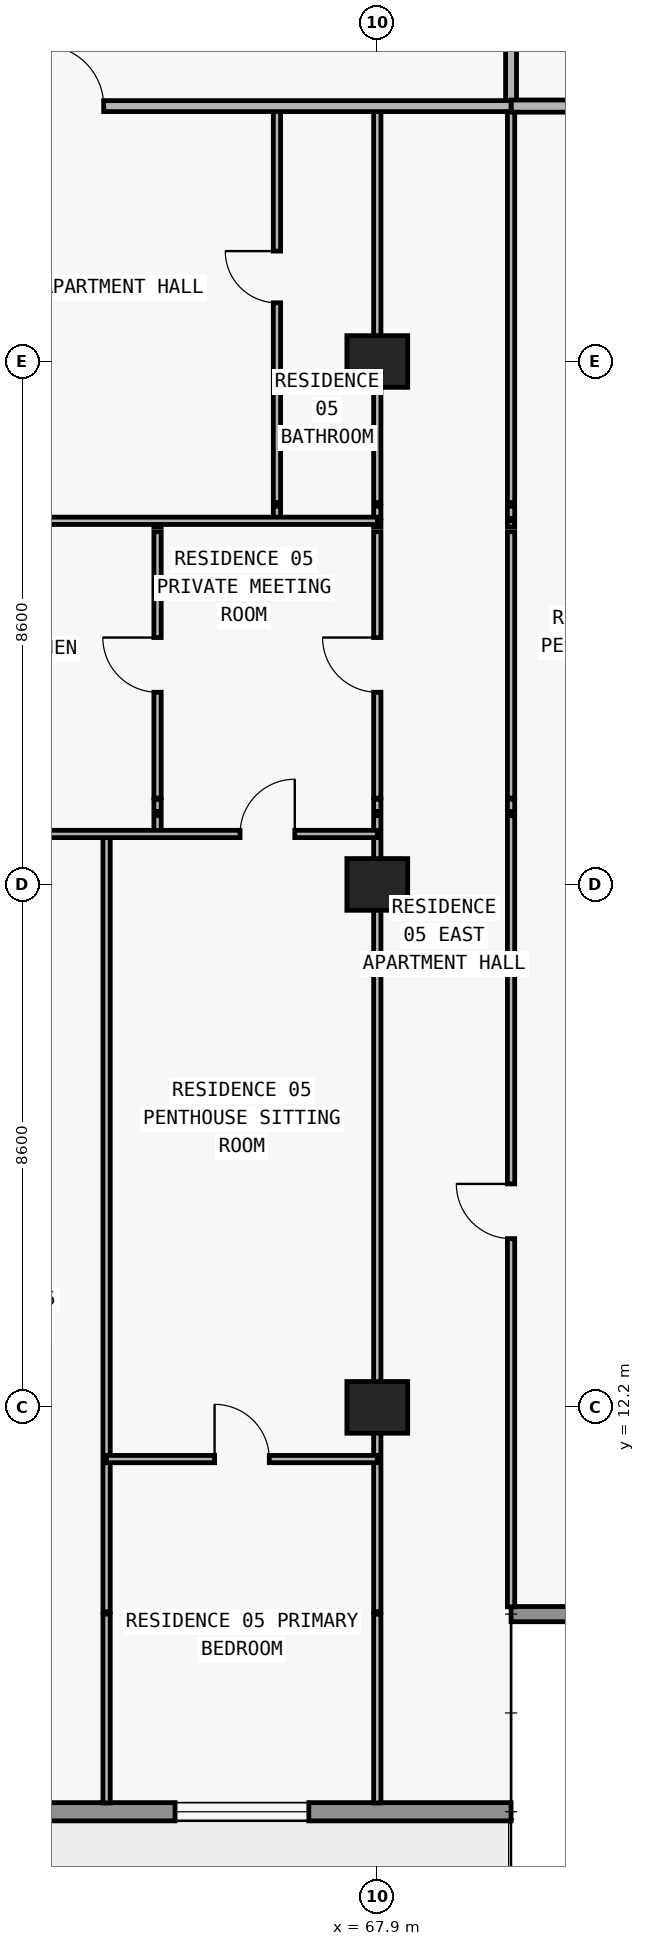
"""IFC4 building model, lengths in metres.
Left out: names, types, materials, properties, quantities, classifications, styles, units other than length and angle.
Written with IfcOpenShell. Run it as: python <this file> out.ifc"""

import sys

from ifc_helpers import new_model, si_unit, direction, frame, frame_2d, origin, origin_2d, place, context, subcontext, project, spatial, rectangle, extrude, element, fill, save


model = new_model("IFC4")
c1 = context("Model", 3, precision=1e-05, world=origin(), true_north=direction((0.0, 1.0)))
c2 = subcontext(c1, "Body", "Model", "MODEL_VIEW")
j1 = project(units=[si_unit("LENGTHUNIT", "METRE"), si_unit("PLANEANGLEUNIT", "RADIAN")], contexts=[c1])
p1 = place(None, origin())
s1 = spatial("IfcSite", under=j1, at=p1, CompositionType="ELEMENT")
p2 = place(p1, origin())
s2 = spatial("IfcBuilding", under=s1, at=p2, CompositionType="ELEMENT")
p3 = place(p2, frame((0.0, 0.0, 119.1)))
s3 = spatial("IfcBuildingStorey", under=s2, at=p3, CompositionType="ELEMENT", Elevation=119.1)
for number, where, z_axis, x_axis in (
    (1, (67.9, 12.2, 0.0), (0.0, 0.0, 1.0), (1.0, 0.0, 0.0)),
    (2, (67.9, 20.8, 0.0), (0.0, 0.0, 1.0), (1.0, 0.0, 0.0)),
    (3, (67.9, 29.4, 0.0), (0.0, 0.0, 1.0), (1.0, 0.0, 0.0)),
):
    element("IfcColumn", number, at=place(p3, frame(where, z_axis=z_axis, x_axis=x_axis)), inside=s3, PredefinedType="COLUMN", context=c2, shape_type="SweptSolid", body=[
        extrude(rectangle(XDim=1.0, YDim=0.85, at=origin_2d()), origin(), (0.0, 0.0, 1.0), 3.05),
    ])
p4 = place(p3, frame((70.1, 5.55, 0.0), z_axis=(0.0, 0.0, 1.0), x_axis=(-1.0, 0.0, 0.0)))
e4 = element("IfcWall", 4, at=p4, inside=s3, PredefinedType="STANDARD", context=c2, shape_type="SweptSolid", body=[
    extrude(rectangle(XDim=62.4, YDim=0.3, at=frame_2d((31.2, 0.0))), origin(), (0.0, 0.0, 1.0), 3.05),
])
p5 = place(p4, frame((57.29, 0.0, 0.0)))
e5 = element("IfcOpeningElement", 5, at=p5, cuts=e4, PredefinedType="OPENING", context=c2, shape_type="SweptSolid", body=[
    extrude(rectangle(XDim=2.0, YDim=2.3, at=frame_2d((1.0, 1.15))), frame((0.0, 0.16, 0.0), z_axis=(0.0, -1.0, 0.0), x_axis=(1.0, 0.0, 0.0)), (0.0, 0.0, 1.0), 0.32),
])
p6 = place(p4, frame((52.61, 0.0, 0.65)))
e6 = element("IfcOpeningElement", 6, at=p6, cuts=e4, PredefinedType="OPENING", context=c2, shape_type="SweptSolid", body=[
    extrude(rectangle(XDim=2.6, YDim=1.85, at=frame_2d((1.3, 0.925))), frame((0.0, 0.16, 0.0), z_axis=(0.0, -1.0, 0.0), x_axis=(1.0, 0.0, 0.0)), (0.0, 0.0, 1.0), 0.32),
])
p7 = place(p4, frame((46.5, 0.0, 0.85)))
e7 = element("IfcOpeningElement", 7, at=p7, cuts=e4, PredefinedType="OPENING", context=c2, shape_type="SweptSolid", body=[
    extrude(rectangle(XDim=2.2, YDim=1.55, at=frame_2d((1.1, 0.775))), frame((0.0, 0.16, 0.0), z_axis=(0.0, -1.0, 0.0), x_axis=(1.0, 0.0, 0.0)), (0.0, 0.0, 1.0), 0.32),
])
p8 = place(p4, frame((40.49, 0.0, 0.0)))
e8 = element("IfcOpeningElement", 8, at=p8, cuts=e4, PredefinedType="OPENING", context=c2, shape_type="SweptSolid", body=[
    extrude(rectangle(XDim=2.0, YDim=2.3, at=frame_2d((1.0, 1.15))), frame((0.0, 0.16, 0.0), z_axis=(0.0, -1.0, 0.0), x_axis=(1.0, 0.0, 0.0)), (0.0, 0.0, 1.0), 0.32),
])
p9 = place(p4, frame((35.81, 0.0, 0.65)))
e9 = element("IfcOpeningElement", 9, at=p9, cuts=e4, PredefinedType="OPENING", context=c2, shape_type="SweptSolid", body=[
    extrude(rectangle(XDim=2.6, YDim=1.85, at=frame_2d((1.3, 0.925))), frame((0.0, 0.16, 0.0), z_axis=(0.0, -1.0, 0.0), x_axis=(1.0, 0.0, 0.0)), (0.0, 0.0, 1.0), 0.32),
])
p10 = place(p4, frame((30.1, 0.0, 0.85)))
e10 = element("IfcOpeningElement", 10, at=p10, cuts=e4, PredefinedType="OPENING", context=c2, shape_type="SweptSolid", body=[
    extrude(rectangle(XDim=2.2, YDim=1.55, at=frame_2d((1.1, 0.775))), frame((0.0, 0.16, 0.0), z_axis=(0.0, -1.0, 0.0), x_axis=(1.0, 0.0, 0.0)), (0.0, 0.0, 1.0), 0.32),
])
p11 = place(p4, frame((24.426, 0.0, 0.0)))
e11 = element("IfcOpeningElement", 11, at=p11, cuts=e4, PredefinedType="OPENING", context=c2, shape_type="SweptSolid", body=[
    extrude(rectangle(XDim=2.0, YDim=2.3, at=frame_2d((1.0, 1.15))), frame((0.0, 0.16, 0.0), z_axis=(0.0, -1.0, 0.0), x_axis=(1.0, 0.0, 0.0)), (0.0, 0.0, 1.0), 0.32),
])
p12 = place(p4, frame((20.126, 0.0, 0.85)))
e12 = element("IfcOpeningElement", 12, at=p12, cuts=e4, PredefinedType="OPENING", context=c2, shape_type="SweptSolid", body=[
    extrude(rectangle(XDim=2.2, YDim=1.55, at=frame_2d((1.1, 0.775))), frame((0.0, 0.16, 0.0), z_axis=(0.0, -1.0, 0.0), x_axis=(1.0, 0.0, 0.0)), (0.0, 0.0, 1.0), 0.32),
])
p13 = place(p4, frame((15.69, 0.0, 0.0)))
e13 = element("IfcOpeningElement", 13, at=p13, cuts=e4, PredefinedType="OPENING", context=c2, shape_type="SweptSolid", body=[
    extrude(rectangle(XDim=2.0, YDim=2.3, at=frame_2d((1.0, 1.15))), frame((0.0, 0.16, 0.0), z_axis=(0.0, -1.0, 0.0), x_axis=(1.0, 0.0, 0.0)), (0.0, 0.0, 1.0), 0.32),
])
p14 = place(p4, frame((11.59, 0.0, 0.85)))
e14 = element("IfcOpeningElement", 14, at=p14, cuts=e4, PredefinedType="OPENING", context=c2, shape_type="SweptSolid", body=[
    extrude(rectangle(XDim=1.8, YDim=1.55, at=frame_2d((0.9, 0.775))), frame((0.0, 0.16, 0.0), z_axis=(0.0, -1.0, 0.0), x_axis=(1.0, 0.0, 0.0)), (0.0, 0.0, 1.0), 0.32),
])
p15 = place(p4, frame((7.626, 0.0, 0.0)))
e15 = element("IfcOpeningElement", 15, at=p15, cuts=e4, PredefinedType="OPENING", context=c2, shape_type="SweptSolid", body=[
    extrude(rectangle(XDim=2.0, YDim=2.3, at=frame_2d((1.0, 1.15))), frame((0.0, 0.16, 0.0), z_axis=(0.0, -1.0, 0.0), x_axis=(1.0, 0.0, 0.0)), (0.0, 0.0, 1.0), 0.32),
])
p16 = place(p4, frame((3.326, 0.0, 0.85)))
e16 = element("IfcOpeningElement", 16, at=p16, cuts=e4, PredefinedType="OPENING", context=c2, shape_type="SweptSolid", body=[
    extrude(rectangle(XDim=2.2, YDim=1.55, at=frame_2d((1.1, 0.775))), frame((0.0, 0.16, 0.0), z_axis=(0.0, -1.0, 0.0), x_axis=(1.0, 0.0, 0.0)), (0.0, 0.0, 1.0), 0.32),
])
p17 = place(p3, frame((70.1, 8.8, 0.0), z_axis=(0.0, 0.0, 1.0), x_axis=(1.0, 0.0, 0.0)))
e17 = element("IfcWall", 17, at=p17, inside=s3, PredefinedType="ELEMENTEDWALL", context=c2, shape_type="SweptSolid", body=[
    extrude(rectangle(XDim=3.65, YDim=0.25, at=frame_2d((1.825, 0.0))), origin(), (0.0, 0.0, 1.0), 3.05),
])
p18 = place(p3, frame((63.448, 5.695, 0.0), z_axis=(0.0, 0.0, 1.0), x_axis=(0.0, 1.0, 0.0)))
e18 = element("IfcWall", 18, at=p18, inside=s3, PredefinedType="PARTITIONING", context=c2, shape_type="SweptSolid", body=[
    extrude(rectangle(XDim=3.105, YDim=0.12, at=frame_2d((1.552, 0.0))), origin(), (0.0, 0.0, 1.0), 3.05),
])
p19 = place(p3, frame((63.448, 8.84, 0.0), z_axis=(0.0, 0.0, 1.0), x_axis=(0.0, 1.0, 0.0)))
e19 = element("IfcWall", 19, at=p19, inside=s3, PredefinedType="PARTITIONING", context=c2, shape_type="SweptSolid", body=[
    extrude(rectangle(XDim=12.79, YDim=0.12, at=frame_2d((6.395, 0.0))), origin(), (0.0, 0.0, 1.0), 3.05),
])
p20 = place(p3, frame((64.286, 21.63, 0.0), z_axis=(0.0, 0.0, 1.0), x_axis=(0.0, 1.0, 0.0)))
e20 = element("IfcWall", 20, at=p20, inside=s3, PredefinedType="PARTITIONING", context=c2, shape_type="SweptSolid", body=[
    extrude(rectangle(XDim=0.3, YDim=0.12, at=frame_2d((0.15, 0.0))), origin(), (0.0, 0.0, 1.0), 3.05),
])
p21 = place(p3, frame((64.286, 22.0, 0.0), z_axis=(0.0, 0.0, 1.0), x_axis=(0.0, 1.0, 0.0)))
e21 = element("IfcWall", 21, at=p21, inside=s3, PredefinedType="PARTITIONING", context=c2, shape_type="SweptSolid", body=[
    extrude(rectangle(XDim=0.2, YDim=0.12, at=frame_2d((0.1, 0.0))), origin(), (0.0, 0.0, 1.0), 3.05),
])
p22 = place(p3, frame((64.286, 22.22, 0.0), z_axis=(0.0, 0.0, 1.0), x_axis=(0.0, 1.0, 0.0)))
e22 = element("IfcWall", 22, at=p22, inside=s3, PredefinedType="PARTITIONING", context=c2, shape_type="SweptSolid", body=[
    extrude(rectangle(XDim=4.38, YDim=0.12, at=frame_2d((2.19, 0.0))), origin(), (0.0, 0.0, 1.0), 3.05),
])
p23 = place(p22, frame((1.74, 0.0, 0.0)))
e23 = element("IfcOpeningElement", 23, at=p23, cuts=e22, PredefinedType="OPENING", context=c2, shape_type="SweptSolid", body=[
    extrude(rectangle(XDim=0.9, YDim=2.15, at=frame_2d((0.45, 1.075))), frame((0.0, 0.07, 0.0), z_axis=(0.0, -1.0, 0.0), x_axis=(1.0, 0.0, 0.0)), (0.0, 0.0, 1.0), 0.14),
])
p24 = place(p3, frame((64.286, 26.68, 0.0), z_axis=(0.0, 0.0, 1.0), x_axis=(0.0, 1.0, 0.0)))
e24 = element("IfcWall", 24, at=p24, inside=s3, PredefinedType="PARTITIONING", context=c2, shape_type="SweptSolid", body=[
    extrude(rectangle(XDim=0.1, YDim=0.12, at=frame_2d((0.05, 0.0))), origin(), (0.0, 0.0, 1.0), 3.05),
])
p25 = place(p3, frame((66.25, 26.82, 0.0), z_axis=(0.0, 0.0, 1.0), x_axis=(0.0, 1.0, 0.0)))
e25 = element("IfcWall", 25, at=p25, inside=s3, PredefinedType="PARTITIONING", context=c2, shape_type="SweptSolid", body=[
    extrude(rectangle(XDim=0.2, YDim=0.12, at=frame_2d((0.1, 0.0))), origin(), (0.0, 0.0, 1.0), 3.05),
])
p26 = place(p3, frame((66.25, 27.08, 0.0), z_axis=(0.0, 0.0, 1.0), x_axis=(0.0, 1.0, 0.0)))
e26 = element("IfcWall", 26, at=p26, inside=s3, PredefinedType="PARTITIONING", context=c2, shape_type="SweptSolid", body=[
    extrude(rectangle(XDim=6.52, YDim=0.12, at=frame_2d((3.26, 0.0))), origin(), (0.0, 0.0, 1.0), 3.05),
])
p27 = place(p26, frame((3.285, 0.0, 0.0)))
e27 = element("IfcOpeningElement", 27, at=p27, cuts=e26, PredefinedType="OPENING", context=c2, shape_type="SweptSolid", body=[
    extrude(rectangle(XDim=0.85, YDim=2.1, at=frame_2d((0.425, 1.05))), frame((0.0, 0.07, 0.0), z_axis=(0.0, -1.0, 0.0), x_axis=(1.0, 0.0, 0.0)), (0.0, 0.0, 1.0), 0.14),
])
p28 = place(p3, frame((67.9, 5.695, 0.0), z_axis=(0.0, 0.0, 1.0), x_axis=(0.0, 1.0, 0.0)))
e28 = element("IfcWall", 28, at=p28, inside=s3, PredefinedType="PARTITIONING", context=c2, shape_type="SweptSolid", body=[
    extrude(rectangle(XDim=3.105, YDim=0.12, at=frame_2d((1.552, 0.0))), origin(), (0.0, 0.0, 1.0), 3.05),
])
p29 = place(p3, frame((67.9, 8.84, 0.0), z_axis=(0.0, 0.0, 1.0), x_axis=(0.0, 1.0, 0.0)))
e29 = element("IfcWall", 29, at=p29, inside=s3, PredefinedType="PARTITIONING", context=c2, shape_type="SweptSolid", body=[
    extrude(rectangle(XDim=13.09, YDim=0.12, at=frame_2d((6.545, 0.0))), origin(), (0.0, 0.0, 1.0), 2.174),
])
p30 = place(p3, frame((67.9, 22.0, 0.0), z_axis=(0.0, 0.0, 1.0), x_axis=(0.0, 1.0, 0.0)))
e30 = element("IfcWall", 30, at=p30, inside=s3, PredefinedType="PARTITIONING", context=c2, shape_type="SweptSolid", body=[
    extrude(rectangle(XDim=0.2, YDim=0.12, at=frame_2d((0.1, 0.0))), origin(), (0.0, 0.0, 1.0), 2.174),
])
p31 = place(p3, frame((67.9, 22.22, 0.0), z_axis=(0.0, 0.0, 1.0), x_axis=(0.0, 1.0, 0.0)))
e31 = element("IfcWall", 31, at=p31, inside=s3, PredefinedType="PARTITIONING", context=c2, shape_type="SweptSolid", body=[
    extrude(rectangle(XDim=4.38, YDim=0.12, at=frame_2d((2.19, 0.0))), origin(), (0.0, 0.0, 1.0), 2.174),
])
p32 = place(p31, frame((1.74, 0.0, 0.0)))
e32 = element("IfcOpeningElement", 32, at=p32, cuts=e31, PredefinedType="OPENING", context=c2, shape_type="SweptSolid", body=[
    extrude(rectangle(XDim=0.9, YDim=2.124, at=frame_2d((0.45, 1.062))), frame((0.0, 0.07, 0.0), z_axis=(0.0, -1.0, 0.0), x_axis=(1.0, 0.0, 0.0)), (0.0, 0.0, 1.0), 0.14),
])
p33 = place(p3, frame((67.9, 26.68, 0.0), z_axis=(0.0, 0.0, 1.0), x_axis=(0.0, 1.0, 0.0)))
e33 = element("IfcWall", 33, at=p33, inside=s3, PredefinedType="PARTITIONING", context=c2, shape_type="SweptSolid", body=[
    extrude(rectangle(XDim=0.1, YDim=0.12, at=frame_2d((0.05, 0.0))), origin(), (0.0, 0.0, 1.0), 2.174),
])
p34 = place(p3, frame((67.9, 26.82, 0.0), z_axis=(0.0, 0.0, 1.0), x_axis=(0.0, 1.0, 0.0)))
e34 = element("IfcWall", 34, at=p34, inside=s3, PredefinedType="PARTITIONING", context=c2, shape_type="SweptSolid", body=[
    extrude(rectangle(XDim=0.2, YDim=0.12, at=frame_2d((0.1, 0.0))), origin(), (0.0, 0.0, 1.0), 2.174),
])
p35 = place(p3, frame((67.9, 27.08, 0.0), z_axis=(0.0, 0.0, 1.0), x_axis=(0.0, 1.0, 0.0)))
e35 = element("IfcWall", 35, at=p35, inside=s3, PredefinedType="PARTITIONING", context=c2, shape_type="SweptSolid", body=[
    extrude(rectangle(XDim=6.52, YDim=0.12, at=frame_2d((3.26, 0.0))), origin(), (0.0, 0.0, 1.0), 2.174),
])
p36 = place(p3, frame((70.1, 8.92, 0.0), z_axis=(0.0, 0.0, 1.0), x_axis=(0.0, 1.0, 0.0)))
e36 = element("IfcWall", 36, at=p36, inside=s3, PredefinedType="PARTITIONING", context=c2, shape_type="SweptSolid", body=[
    extrude(rectangle(XDim=13.01, YDim=0.12, at=frame_2d((6.505, 0.0))), origin(), (0.0, 0.0, 1.0), 3.05),
])
p37 = place(p36, frame((6.055, 0.0, 0.0)))
e37 = element("IfcOpeningElement", 37, at=p37, cuts=e36, PredefinedType="OPENING", context=c2, shape_type="SweptSolid", body=[
    extrude(rectangle(XDim=0.9, YDim=2.15, at=frame_2d((0.45, 1.075))), frame((0.0, 0.07, 0.0), z_axis=(0.0, -1.0, 0.0), x_axis=(1.0, 0.0, 0.0)), (0.0, 0.0, 1.0), 0.14),
])
p38 = place(p3, frame((70.1, 22.0, 0.0), z_axis=(0.0, 0.0, 1.0), x_axis=(0.0, 1.0, 0.0)))
e38 = element("IfcWall", 38, at=p38, inside=s3, PredefinedType="PARTITIONING", context=c2, shape_type="SweptSolid", body=[
    extrude(rectangle(XDim=0.2, YDim=0.12, at=frame_2d((0.1, 0.0))), origin(), (0.0, 0.0, 1.0), 3.05),
])
p39 = place(p3, frame((70.1, 22.22, 0.0), z_axis=(0.0, 0.0, 1.0), x_axis=(0.0, 1.0, 0.0)))
e39 = element("IfcWall", 39, at=p39, inside=s3, PredefinedType="PARTITIONING", context=c2, shape_type="SweptSolid", body=[
    extrude(rectangle(XDim=4.38, YDim=0.12, at=frame_2d((2.19, 0.0))), origin(), (0.0, 0.0, 1.0), 3.05),
])
p40 = place(p3, frame((70.1, 26.68, 0.0), z_axis=(0.0, 0.0, 1.0), x_axis=(0.0, 1.0, 0.0)))
e40 = element("IfcWall", 40, at=p40, inside=s3, PredefinedType="PARTITIONING", context=c2, shape_type="SweptSolid", body=[
    extrude(rectangle(XDim=0.1, YDim=0.12, at=frame_2d((0.05, 0.0))), origin(), (0.0, 0.0, 1.0), 3.05),
])
p41 = place(p3, frame((70.1, 26.82, 0.0), z_axis=(0.0, 0.0, 1.0), x_axis=(0.0, 1.0, 0.0)))
e41 = element("IfcWall", 41, at=p41, inside=s3, PredefinedType="PARTITIONING", context=c2, shape_type="SweptSolid", body=[
    extrude(rectangle(XDim=0.2, YDim=0.12, at=frame_2d((0.1, 0.0))), origin(), (0.0, 0.0, 1.0), 3.05),
])
p42 = place(p3, frame((70.1, 27.08, 0.0), z_axis=(0.0, 0.0, 1.0), x_axis=(0.0, 1.0, 0.0)))
e42 = element("IfcWall", 42, at=p42, inside=s3, PredefinedType="PARTITIONING", context=c2, shape_type="SweptSolid", body=[
    extrude(rectangle(XDim=6.52, YDim=0.12, at=frame_2d((3.26, 0.0))), origin(), (0.0, 0.0, 1.0), 3.05),
])
p43 = place(p3, frame((70.1, 33.605, 0.0), z_axis=(0.0, 0.0, 1.0), x_axis=(0.0, 1.0, 0.0)))
e43 = element("IfcWall", 43, at=p43, inside=s3, PredefinedType="PARTITIONING", context=c2, shape_type="SweptSolid", body=[
    extrude(rectangle(XDim=3.345, YDim=0.18, at=frame_2d((1.672, 0.0))), origin(), (0.0, 0.0, 1.0), 3.05),
])
p44 = place(p3, frame((63.448, 11.35, 0.0), z_axis=(0.0, 0.0, 1.0), x_axis=(1.0, 0.0, 0.0)))
e44 = element("IfcWall", 44, at=p44, inside=s3, PredefinedType="PARTITIONING", context=c2, shape_type="SweptSolid", body=[
    extrude(rectangle(XDim=4.452, YDim=0.12, at=frame_2d((2.226, 0.0))), origin(), (0.0, 0.0, 1.0), 3.05),
])
p45 = place(p44, frame((1.776, 0.0, 0.0)))
e45 = element("IfcOpeningElement", 45, at=p45, cuts=e44, PredefinedType="OPENING", context=c2, shape_type="SweptSolid", body=[
    extrude(rectangle(XDim=0.9, YDim=2.15, at=frame_2d((0.45, 1.075))), frame((0.0, 0.07, 0.0), z_axis=(0.0, -1.0, 0.0), x_axis=(1.0, 0.0, 0.0)), (0.0, 0.0, 1.0), 0.14),
])
p46 = place(p3, frame((59.55, 21.63, 0.0), z_axis=(0.0, 0.0, 1.0), x_axis=(1.0, 0.0, 0.0)))
e46 = element("IfcWall", 46, at=p46, inside=s3, PredefinedType="PARTITIONING", context=c2, shape_type="SweptSolid", body=[
    extrude(rectangle(XDim=8.35, YDim=0.12, at=frame_2d((4.175, 0.0))), origin(), (0.0, 0.0, 1.0), 3.05),
])
p47 = place(p46, frame((1.499, 0.0, 0.0)))
e47 = element("IfcOpeningElement", 47, at=p47, cuts=e46, PredefinedType="OPENING", context=c2, shape_type="SweptSolid", body=[
    extrude(rectangle(XDim=0.9, YDim=2.15, at=frame_2d((0.45, 1.075))), frame((0.0, 0.07, 0.0), z_axis=(0.0, -1.0, 0.0), x_axis=(1.0, 0.0, 0.0)), (0.0, 0.0, 1.0), 0.14),
])
p48 = place(p46, frame((6.093, 0.0, 0.0)))
e48 = element("IfcOpeningElement", 48, at=p48, cuts=e46, PredefinedType="OPENING", context=c2, shape_type="SweptSolid", body=[
    extrude(rectangle(XDim=0.9, YDim=2.15, at=frame_2d((0.45, 1.075))), frame((0.0, 0.07, 0.0), z_axis=(0.0, -1.0, 0.0), x_axis=(1.0, 0.0, 0.0)), (0.0, 0.0, 1.0), 0.14),
])
p49 = place(p3, frame((59.55, 26.78, 0.0), z_axis=(0.0, 0.0, 1.0), x_axis=(1.0, 0.0, 0.0)))
e49 = element("IfcWall", 49, at=p49, inside=s3, PredefinedType="PARTITIONING", context=c2, shape_type="SweptSolid", body=[
    extrude(rectangle(XDim=8.35, YDim=0.12, at=frame_2d((4.175, 0.0))), origin(), (0.0, 0.0, 1.0), 3.05),
])
p50 = place(p49, frame((1.918, 0.0, 0.0)))
e50 = element("IfcOpeningElement", 50, at=p50, cuts=e49, PredefinedType="OPENING", context=c2, shape_type="SweptSolid", body=[
    extrude(rectangle(XDim=0.9, YDim=2.15, at=frame_2d((0.45, 1.075))), frame((0.0, 0.07, 0.0), z_axis=(0.0, -1.0, 0.0), x_axis=(1.0, 0.0, 0.0)), (0.0, 0.0, 1.0), 0.14),
])
p51 = place(p3, frame((59.55, 33.6, 0.0), z_axis=(0.0, 0.0, 1.0), x_axis=(1.0, 0.0, 0.0)))
e51 = element("IfcWall", 51, at=p51, inside=s3, PredefinedType="PARTITIONING", context=c2, shape_type="SweptSolid", body=[
    extrude(rectangle(XDim=10.55, YDim=0.18, at=frame_2d((5.275, 0.0))), origin(), (0.0, 0.0, 1.0), 3.05),
])
p52 = place(p51, frame((2.85, 0.0, 0.0)))
e52 = element("IfcOpeningElement", 52, at=p52, cuts=e51, PredefinedType="OPENING", context=c2, shape_type="SweptSolid", body=[
    extrude(rectangle(XDim=1.0, YDim=2.2, at=frame_2d((0.5, 1.1))), frame((0.0, 0.1, 0.0), z_axis=(0.0, -1.0, 0.0), x_axis=(1.0, 0.0, 0.0)), (0.0, 0.0, 1.0), 0.2),
])
p53 = place(p3, frame((70.105, 33.6, 0.0), z_axis=(0.0, 0.0, 1.0), x_axis=(1.0, 0.0, 0.0)))
e53 = element("IfcWall", 53, at=p53, inside=s3, PredefinedType="PARTITIONING", context=c2, shape_type="SweptSolid", body=[
    extrude(rectangle(XDim=3.5, YDim=0.2, at=frame_2d((1.75, 0.0))), origin(), (0.0, 0.0, 1.0), 3.05),
])
p54 = place(p16, origin())
e54 = element("IfcWindow", 54, at=p54, inside=s3, PartitioningType="SINGLE_PANEL", PredefinedType="WINDOW", context=c2, shape_type="SweptSolid", body=[
    extrude(rectangle(XDim=2.2, YDim=1.55, at=frame_2d((1.1, 0.775))), frame((0.0, 0.03, 0.0), z_axis=(0.0, -1.0, 0.0), x_axis=(1.0, 0.0, 0.0)), (0.0, 0.0, 1.0), 0.06),
])
fill(e16, e54)
p55 = place(p52, origin())
e55 = element("IfcDoor", 55, at=p55, inside=s3, OperationType="SINGLE_SWING_LEFT", PredefinedType="DOOR", context=c2, shape_type="SweptSolid", body=[
    extrude(rectangle(XDim=1.0, YDim=2.2, at=frame_2d((0.5, 1.1))), frame((0.0, 0.025, 0.0), z_axis=(0.0, -1.0, 0.0), x_axis=(1.0, 0.0, 0.0)), (0.0, 0.0, 1.0), 0.05),
])
fill(e52, e55)
p56 = place(p27, origin())
e56 = element("IfcDoor", 56, at=p56, inside=s3, OperationType="SINGLE_SWING_RIGHT", PredefinedType="DOOR", context=c2, shape_type="SweptSolid", body=[
    extrude(rectangle(XDim=0.85, YDim=2.1, at=frame_2d((0.425, 1.05))), frame((0.0, 0.025, 0.0), z_axis=(0.0, -1.0, 0.0), x_axis=(1.0, 0.0, 0.0)), (0.0, 0.0, 1.0), 0.05),
])
fill(e27, e56)
p57 = place(p23, origin())
e57 = element("IfcDoor", 57, at=p57, inside=s3, OperationType="SINGLE_SWING_RIGHT", PredefinedType="DOOR", context=c2, shape_type="SweptSolid", body=[
    extrude(rectangle(XDim=0.9, YDim=2.15, at=frame_2d((0.45, 1.075))), frame((0.0, 0.025, 0.0), z_axis=(0.0, -1.0, 0.0), x_axis=(1.0, 0.0, 0.0)), (0.0, 0.0, 1.0), 0.05),
])
fill(e23, e57)
p58 = place(p48, origin())
e58 = element("IfcDoor", 58, at=p58, inside=s3, OperationType="SINGLE_SWING_RIGHT", PredefinedType="DOOR", context=c2, shape_type="SweptSolid", body=[
    extrude(rectangle(XDim=0.9, YDim=2.15, at=frame_2d((0.45, 1.075))), frame((0.0, 0.025, 0.0), z_axis=(0.0, -1.0, 0.0), x_axis=(1.0, 0.0, 0.0)), (0.0, 0.0, 1.0), 0.05),
])
fill(e48, e58)
p59 = place(p45, origin())
e59 = element("IfcDoor", 59, at=p59, inside=s3, OperationType="SINGLE_SWING_LEFT", PredefinedType="DOOR", context=c2, shape_type="SweptSolid", body=[
    extrude(rectangle(XDim=0.9, YDim=2.15, at=frame_2d((0.45, 1.075))), frame((0.0, 0.025, 0.0), z_axis=(0.0, -1.0, 0.0), x_axis=(1.0, 0.0, 0.0)), (0.0, 0.0, 1.0), 0.05),
])
fill(e45, e59)
p60 = place(p32, origin())
e60 = element("IfcDoor", 60, at=p60, inside=s3, OperationType="SINGLE_SWING_RIGHT", PredefinedType="DOOR", context=c2, shape_type="SweptSolid", body=[
    extrude(rectangle(XDim=0.9, YDim=2.124, at=frame_2d((0.45, 1.062))), frame((0.0, 0.025, 0.0), z_axis=(0.0, -1.0, 0.0), x_axis=(1.0, 0.0, 0.0)), (0.0, 0.0, 1.0), 0.05),
])
fill(e32, e60)
p61 = place(p37, origin())
e61 = element("IfcDoor", 61, at=p61, inside=s3, OperationType="SINGLE_SWING_RIGHT", PredefinedType="DOOR", context=c2, shape_type="SweptSolid", body=[
    extrude(rectangle(XDim=0.9, YDim=2.15, at=frame_2d((0.45, 1.075))), frame((0.0, 0.025, 0.0), z_axis=(0.0, -1.0, 0.0), x_axis=(1.0, 0.0, 0.0)), (0.0, 0.0, 1.0), 0.05),
])
fill(e37, e61)
save(model, sys.argv[1])
